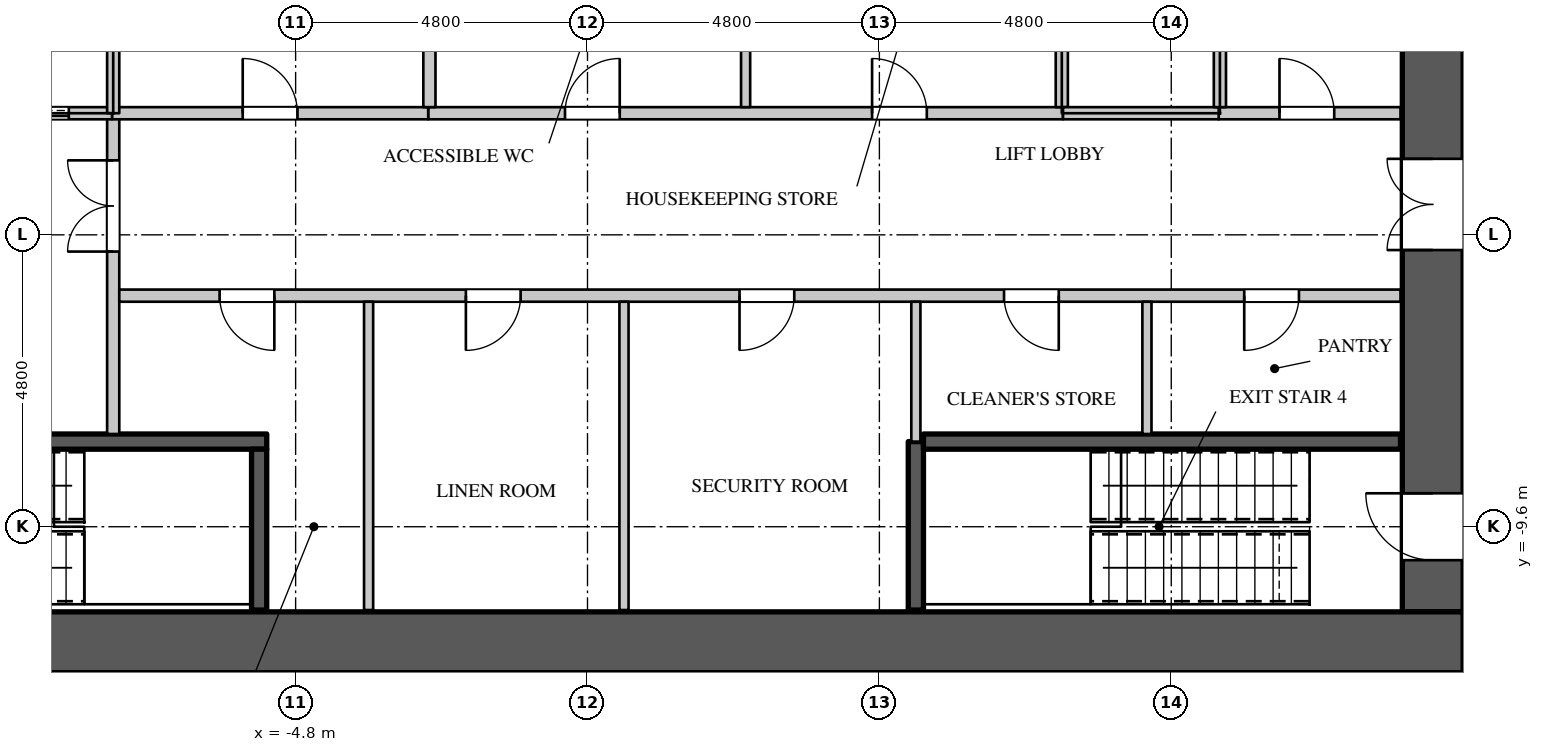
"""IFC4 building model, lengths in metres.
Left out: names, types, materials, properties, quantities, classifications, styles, units other than length and angle.
Written with IfcOpenShell. Run it as: python <this file> out.ifc"""

import sys

from ifc_helpers import new_model, si_unit, direction, frame, frame_2d, origin, place, context, subcontext, project, spatial, rectangle, extrude, element, fill, save


model = new_model("IFC4")
c1 = context("Model", 3, precision=1e-05, world=origin(), true_north=direction((0.0, 1.0)))
c2 = subcontext(c1, "Body", "Model", "MODEL_VIEW")
j1 = project(units=[si_unit("LENGTHUNIT", "METRE"), si_unit("PLANEANGLEUNIT", "RADIAN")], contexts=[c1])
p1 = place(None, origin())
s1 = spatial("IfcSite", under=j1, at=p1, CompositionType="ELEMENT")
p2 = place(p1, origin())
s2 = spatial("IfcBuilding", under=s1, at=p2, CompositionType="ELEMENT")
p3 = place(p2, frame((0.0, 0.0, 92.7)))
s3 = spatial("IfcBuildingStorey", under=s2, at=p3, CompositionType="ELEMENT", Elevation=92.7)
p4 = place(p3, frame((-14.4, -11.5, 0.0), z_axis=(0.0, 0.0, 1.0), x_axis=(1.0, 0.0, 0.0)))
e1 = element("IfcWall", 1, at=p4, inside=s3, PredefinedType="SHEAR", context=c2, shape_type="SweptSolid", body=[
    extrude(rectangle(XDim=28.8, YDim=1.0, at=frame_2d((14.4, 0.0))), origin(), (0.0, 0.0, 1.0), 4.2),
])
p5 = place(p3, frame((13.9, -11.0, 0.0), z_axis=(0.0, 0.0, 1.0), x_axis=(0.0, 1.0, 0.0)))
e2 = element("IfcWall", 2, at=p5, inside=s3, PredefinedType="SHEAR", context=c2, shape_type="SweptSolid", body=[
    extrude(rectangle(XDim=22.0, YDim=1.0, at=frame_2d((11.0, 0.0))), origin(), (0.0, 0.0, 1.0), 4.2),
])
p6 = place(p5, frame((20.05, 0.0, 0.0)))
e3 = element("IfcOpeningElement", 3, at=p6, cuts=e2, PredefinedType="OPENING", context=c2, shape_type="SweptSolid", body=[
    extrude(rectangle(XDim=1.1, YDim=2.2, at=frame_2d((0.55, 1.1))), frame((0.0, 0.51, 0.0), z_axis=(0.0, -1.0, 0.0), x_axis=(1.0, 0.0, 0.0)), (0.0, 0.0, 1.0), 1.02),
])
p7 = place(p5, frame((0.85, 0.0, 0.0)))
e4 = element("IfcOpeningElement", 4, at=p7, cuts=e2, PredefinedType="OPENING", context=c2, shape_type="SweptSolid", body=[
    extrude(rectangle(XDim=1.1, YDim=2.2, at=frame_2d((0.55, 1.1))), frame((0.0, 0.51, 0.0), z_axis=(0.0, -1.0, 0.0), x_axis=(1.0, 0.0, 0.0)), (0.0, 0.0, 1.0), 1.02),
])
p8 = place(p5, frame((14.55, 0.0, 0.0)))
e5 = element("IfcOpeningElement", 5, at=p8, cuts=e2, PredefinedType="OPENING", context=c2, shape_type="SweptSolid", body=[
    extrude(rectangle(XDim=1.5, YDim=2.4, at=frame_2d((0.75, 1.2))), frame((0.0, 0.51, 0.0), z_axis=(0.0, -1.0, 0.0), x_axis=(1.0, 0.0, 0.0)), (0.0, 0.0, 1.0), 1.02),
])
p9 = place(p5, frame((5.95, 0.0, 0.0)))
e6 = element("IfcOpeningElement", 6, at=p9, cuts=e2, PredefinedType="OPENING", context=c2, shape_type="SweptSolid", body=[
    extrude(rectangle(XDim=1.5, YDim=2.4, at=frame_2d((0.75, 1.2))), frame((0.0, 0.51, 0.0), z_axis=(0.0, -1.0, 0.0), x_axis=(1.0, 0.0, 0.0)), (0.0, 0.0, 1.0), 1.02),
])
p10 = place(p3, frame((-7.8, -8.075, 0.0), z_axis=(0.0, 0.0, 1.0), x_axis=(0.0, 1.0, 0.0)))
e7 = element("IfcWall", 7, at=p10, inside=s3, PredefinedType="PARTITIONING", context=c2, shape_type="SweptSolid", body=[
    extrude(rectangle(XDim=5.275, YDim=0.2, at=frame_2d((2.637, 0.0))), origin(), (0.0, 0.0, 1.0), 3.798),
])
p11 = place(p10, frame((3.0, 0.0, 0.0)))
e8 = element("IfcOpeningElement", 8, at=p11, cuts=e7, PredefinedType="OPENING", context=c2, shape_type="SweptSolid", body=[
    extrude(rectangle(XDim=1.5, YDim=2.4, at=frame_2d((0.75, 1.2))), frame((0.0, 0.11, 0.0), z_axis=(0.0, -1.0, 0.0), x_axis=(1.0, 0.0, 0.0)), (0.0, 0.0, 1.0), 0.22),
])
p12 = place(p3, frame((-7.7, -5.8, 0.0), z_axis=(0.0, 0.0, 1.0), x_axis=(1.0, 0.0, 0.0)))
e9 = element("IfcWall", 9, at=p12, inside=s3, PredefinedType="PARTITIONING", context=c2, shape_type="SweptSolid", body=[
    extrude(rectangle(XDim=21.07, YDim=0.2, at=frame_2d((10.535, 0.0))), origin(), (0.0, 0.0, 1.0), 3.798),
])
p13 = place(p12, frame((1.65, 0.0, 0.0)))
e10 = element("IfcOpeningElement", 10, at=p13, cuts=e9, PredefinedType="OPENING", context=c2, shape_type="SweptSolid", body=[
    extrude(rectangle(XDim=0.9, YDim=2.2, at=frame_2d((0.45, 1.1))), frame((0.0, 0.11, 0.0), z_axis=(0.0, -1.0, 0.0), x_axis=(1.0, 0.0, 0.0)), (0.0, 0.0, 1.0), 0.22),
])
p14 = place(p12, frame((5.7, 0.0, 0.0)))
e11 = element("IfcOpeningElement", 11, at=p14, cuts=e9, PredefinedType="OPENING", context=c2, shape_type="SweptSolid", body=[
    extrude(rectangle(XDim=0.9, YDim=2.2, at=frame_2d((0.45, 1.1))), frame((0.0, 0.11, 0.0), z_axis=(0.0, -1.0, 0.0), x_axis=(1.0, 0.0, 0.0)), (0.0, 0.0, 1.0), 0.22),
])
p15 = place(p12, frame((10.2, 0.0, 0.0)))
e12 = element("IfcOpeningElement", 12, at=p15, cuts=e9, PredefinedType="OPENING", context=c2, shape_type="SweptSolid", body=[
    extrude(rectangle(XDim=0.9, YDim=2.2, at=frame_2d((0.45, 1.1))), frame((0.0, 0.11, 0.0), z_axis=(0.0, -1.0, 0.0), x_axis=(1.0, 0.0, 0.0)), (0.0, 0.0, 1.0), 0.22),
])
p16 = place(p12, frame((14.55, 0.0, 0.0)))
e13 = element("IfcOpeningElement", 13, at=p16, cuts=e9, PredefinedType="OPENING", context=c2, shape_type="SweptSolid", body=[
    extrude(rectangle(XDim=0.9, YDim=2.2, at=frame_2d((0.45, 1.1))), frame((0.0, 0.11, 0.0), z_axis=(0.0, -1.0, 0.0), x_axis=(1.0, 0.0, 0.0)), (0.0, 0.0, 1.0), 0.22),
])
p17 = place(p12, frame((18.5, 0.0, 0.0)))
e14 = element("IfcOpeningElement", 14, at=p17, cuts=e9, PredefinedType="OPENING", context=c2, shape_type="SweptSolid", body=[
    extrude(rectangle(XDim=0.9, YDim=2.2, at=frame_2d((0.45, 1.1))), frame((0.0, 0.11, 0.0), z_axis=(0.0, -1.0, 0.0), x_axis=(1.0, 0.0, 0.0)), (0.0, 0.0, 1.0), 0.22),
])
p18 = place(p3, frame((-2.62, -2.8, 0.0), z_axis=(0.0, 0.0, 1.0), x_axis=(1.0, 0.0, 0.0)))
e15 = element("IfcWall", 15, at=p18, inside=s3, PredefinedType="PARTITIONING", context=c2, shape_type="SweptSolid", body=[
    extrude(rectangle(XDim=10.44, YDim=0.2, at=frame_2d((5.22, 0.0))), origin(), (0.0, 0.0, 1.0), 3.798),
])
p19 = place(p18, frame((2.25, 0.0, 0.0)))
e16 = element("IfcOpeningElement", 16, at=p19, cuts=e15, PredefinedType="OPENING", context=c2, shape_type="SweptSolid", body=[
    extrude(rectangle(XDim=0.9, YDim=2.2, at=frame_2d((0.45, 1.1))), frame((0.0, 0.11, 0.0), z_axis=(0.0, -1.0, 0.0), x_axis=(1.0, 0.0, 0.0)), (0.0, 0.0, 1.0), 0.22),
])
p20 = place(p18, frame((7.3, 0.0, 0.0)))
e17 = element("IfcOpeningElement", 17, at=p20, cuts=e15, PredefinedType="OPENING", context=c2, shape_type="SweptSolid", body=[
    extrude(rectangle(XDim=0.9, YDim=2.2, at=frame_2d((0.45, 1.1))), frame((0.0, 0.11, 0.0), z_axis=(0.0, -1.0, 0.0), x_axis=(1.0, 0.0, 0.0)), (0.0, 0.0, 1.0), 0.22),
])
for number, where, z_axis, x_axis in (
    (18, (-3.6, -10.97, 0.0), (0.0, 0.0, 1.0), (0.0, 1.0, 0.0)),
    (19, (0.6, -10.97, 0.0), (0.0, 0.0, 1.0), (0.0, 1.0, 0.0)),
):
    element("IfcWall", number, at=place(p3, frame(where, z_axis=z_axis, x_axis=x_axis)), inside=s3, PredefinedType="PARTITIONING", context=c2, shape_type="SweptSolid", body=[
        extrude(rectangle(XDim=5.07, YDim=0.15, at=frame_2d((2.535, 0.0))), origin(), (0.0, 0.0, 1.0), 3.798),
    ])
p21 = place(p3, frame((2.6, -2.7, 0.0), z_axis=(0.0, 0.0, 1.0), x_axis=(0.0, 1.0, 0.0)))
e20 = element("IfcWall", 20, at=p21, inside=s3, PredefinedType="PARTITIONING", context=c2, shape_type="SweptSolid", body=[
    extrude(rectangle(XDim=2.7, YDim=0.15, at=frame_2d((1.35, 0.0))), origin(), (0.0, 0.0, 1.0), 3.798),
])
p22 = place(p3, frame((5.4, -8.2, 0.0), z_axis=(0.0, 0.0, 1.0), x_axis=(0.0, 1.0, 0.0)))
e21 = element("IfcWall", 21, at=p22, inside=s3, PredefinedType="PARTITIONING", context=c2, shape_type="SweptSolid", body=[
    extrude(rectangle(XDim=2.3, YDim=0.15, at=frame_2d((1.15, 0.0))), origin(), (0.0, 0.0, 1.0), 3.798),
])
p23 = place(p3, frame((9.2, -8.075, 0.0), z_axis=(0.0, 0.0, 1.0), x_axis=(0.0, 1.0, 0.0)))
e22 = element("IfcWall", 22, at=p23, inside=s3, PredefinedType="PARTITIONING", context=c2, shape_type="SweptSolid", body=[
    extrude(rectangle(XDim=2.175, YDim=0.15, at=frame_2d((1.087, 0.0))), origin(), (0.0, 0.0, 1.0), 3.798),
])
p24 = place(p3, frame((-7.82, -2.8, 0.0), z_axis=(0.0, 0.0, 1.0), x_axis=(1.0, 0.0, 0.0)))
e23 = element("IfcWall", 23, at=p24, inside=s3, PredefinedType="PARTITIONING", context=c2, shape_type="SweptSolid", body=[
    extrude(rectangle(XDim=5.2, YDim=0.2, at=frame_2d((2.6, 0.0))), origin(), (0.0, 0.0, 1.0), 3.798),
])
p25 = place(p24, frame((2.15, 0.0, 0.0)))
e24 = element("IfcOpeningElement", 24, at=p25, cuts=e23, PredefinedType="OPENING", context=c2, shape_type="SweptSolid", body=[
    extrude(rectangle(XDim=0.9, YDim=2.2, at=frame_2d((0.45, 1.1))), frame((0.0, 0.11, 0.0), z_axis=(0.0, -1.0, 0.0), x_axis=(1.0, 0.0, 0.0)), (0.0, 0.0, 1.0), 0.22),
])
p26 = place(p3, frame((-2.6, -2.7, 0.0), z_axis=(0.0, 0.0, 1.0), x_axis=(0.0, 1.0, 0.0)))
e25 = element("IfcWall", 25, at=p26, inside=s3, PredefinedType="PARTITIONING", context=c2, shape_type="SweptSolid", body=[
    extrude(rectangle(XDim=2.7, YDim=0.2, at=frame_2d((1.35, 0.0))), origin(), (0.0, 0.0, 1.0), 3.798),
])
p27 = place(p3, frame((10.38, -2.8, 0.0), z_axis=(0.0, 0.0, 1.0), x_axis=(1.0, 0.0, 0.0)))
e26 = element("IfcWall", 26, at=p27, inside=s3, PredefinedType="PARTITIONING", context=c2, shape_type="SweptSolid", body=[
    extrude(rectangle(XDim=2.99, YDim=0.2, at=frame_2d((1.495, 0.0))), origin(), (0.0, 0.0, 1.0), 3.798),
])
p28 = place(p27, frame((1.0, 0.0, 0.0)))
e27 = element("IfcOpeningElement", 27, at=p28, cuts=e26, PredefinedType="OPENING", context=c2, shape_type="SweptSolid", body=[
    extrude(rectangle(XDim=0.9, YDim=2.2, at=frame_2d((0.45, 1.1))), frame((0.0, 0.11, 0.0), z_axis=(0.0, -1.0, 0.0), x_axis=(1.0, 0.0, 0.0)), (0.0, 0.0, 1.0), 0.22),
])
p29 = place(p3, frame((-10.38, -2.8, 0.0), z_axis=(0.0, 0.0, 1.0), x_axis=(1.0, 0.0, 0.0)))
e28 = element("IfcWall", 28, at=p29, inside=s3, PredefinedType="PARTITIONING", context=c2, shape_type="SweptSolid", body=[
    extrude(rectangle(XDim=2.56, YDim=0.2, at=frame_2d((1.28, 0.0))), origin(), (0.0, 0.0, 1.0), 3.798),
])
p30 = place(p29, frame((0.75, 0.0, 0.0)))
e29 = element("IfcOpeningElement", 29, at=p30, cuts=e28, PredefinedType="OPENING", context=c2, shape_type="SweptSolid", body=[
    extrude(rectangle(XDim=1.1, YDim=2.2, at=frame_2d((0.55, 1.1))), frame((0.0, 0.11, 0.0), z_axis=(0.0, -1.0, 0.0), x_axis=(1.0, 0.0, 0.0)), (0.0, 0.0, 1.0), 0.22),
])
p31 = place(p3, frame((-7.8, -2.8, 0.0), z_axis=(0.0, 0.0, 1.0), x_axis=(0.0, 1.0, 0.0)))
e30 = element("IfcWall", 30, at=p31, inside=s3, PredefinedType="PARTITIONING", context=c2, shape_type="SweptSolid", body=[
    extrude(rectangle(XDim=2.8, YDim=0.2, at=frame_2d((1.4, 0.0))), origin(), (0.0, 0.0, 1.0), 3.798),
])
p32 = place(p3, frame((7.8, -2.7, 0.0), z_axis=(0.0, 0.0, 1.0), x_axis=(0.0, 1.0, 0.0)))
e31 = element("IfcWall", 31, at=p32, inside=s3, PredefinedType="PARTITIONING", context=c2, shape_type="SweptSolid", body=[
    extrude(rectangle(XDim=2.7, YDim=0.2, at=frame_2d((1.35, 0.0))), origin(), (0.0, 0.0, 1.0), 3.798),
])
p33 = place(p3, frame((7.82, -2.8, 0.0), z_axis=(0.0, 0.0, 1.0), x_axis=(1.0, 0.0, 0.0)))
e32 = element("IfcWall", 32, at=p33, inside=s3, PredefinedType="PARTITIONING", context=c2, shape_type="SweptSolid", body=[
    extrude(rectangle(XDim=2.56, YDim=0.2, at=frame_2d((1.28, 0.0))), origin(), (0.0, 0.0, 1.0), 3.798),
])
p34 = place(p3, frame((10.4, -2.7, 0.0), z_axis=(0.0, 0.0, 1.0), x_axis=(0.0, 1.0, 0.0)))
e33 = element("IfcWall", 33, at=p34, inside=s3, PredefinedType="PARTITIONING", context=c2, shape_type="SweptSolid", body=[
    extrude(rectangle(XDim=5.4, YDim=0.2, at=frame_2d((2.7, 0.0))), origin(), (0.0, 0.0, 1.0), 3.798),
])
p35 = place(p3, frame((-13.37, -8.2, 0.0), z_axis=(0.0, 0.0, 1.0), x_axis=(1.0, 0.0, 0.0)))
e34 = element("IfcWall", 34, at=p35, inside=s3, PredefinedType="SHEAR", context=c2, shape_type="SweptSolid", body=[
    extrude(rectangle(XDim=8.095, YDim=0.25, at=frame_2d((4.048, 0.0))), origin(), (0.0, 0.0, 1.0), 3.798),
])
p36 = place(p35, frame((0.15, 0.0, 0.0)))
e35 = element("IfcOpeningElement", 35, at=p36, cuts=e34, PredefinedType="OPENING", context=c2, shape_type="SweptSolid", body=[
    extrude(rectangle(XDim=1.1, YDim=2.2, at=frame_2d((0.55, 1.1))), frame((0.0, 0.135, 0.0), z_axis=(0.0, -1.0, 0.0), x_axis=(1.0, 0.0, 0.0)), (0.0, 0.0, 1.0), 0.27),
])
p37 = place(p3, frame((-5.4, -10.97, 0.0), z_axis=(0.0, 0.0, 1.0), x_axis=(0.0, 1.0, 0.0)))
e36 = element("IfcWall", 36, at=p37, inside=s3, PredefinedType="SHEAR", context=c2, shape_type="SweptSolid", body=[
    extrude(rectangle(XDim=2.645, YDim=0.25, at=frame_2d((1.323, 0.0))), origin(), (0.0, 0.0, 1.0), 3.798),
])
p38 = place(p3, frame((5.4, -10.97, 0.0), z_axis=(0.0, 0.0, 1.0), x_axis=(0.0, 1.0, 0.0)))
e37 = element("IfcWall", 37, at=p38, inside=s3, PredefinedType="SHEAR", context=c2, shape_type="SweptSolid", body=[
    extrude(rectangle(XDim=2.77, YDim=0.25, at=frame_2d((1.385, 0.0))), origin(), (0.0, 0.0, 1.0), 3.798),
])
p39 = place(p3, frame((5.525, -8.2, 0.0), z_axis=(0.0, 0.0, 1.0), x_axis=(1.0, 0.0, 0.0)))
e38 = element("IfcWall", 38, at=p39, inside=s3, PredefinedType="SHEAR", context=c2, shape_type="SweptSolid", body=[
    extrude(rectangle(XDim=7.845, YDim=0.25, at=frame_2d((3.923, 0.0))), origin(), (0.0, 0.0, 1.0), 3.798),
])
p40 = place(p28, origin())
e39 = element("IfcDoor", 39, at=p40, inside=s3, OperationType="SINGLE_SWING_LEFT", PredefinedType="DOOR", context=c2, shape_type="SweptSolid", body=[
    extrude(rectangle(XDim=0.9, YDim=2.2, at=frame_2d((0.45, 1.1))), frame((0.0, 0.025, 0.0), z_axis=(0.0, -1.0, 0.0), x_axis=(1.0, 0.0, 0.0)), (0.0, 0.0, 1.0), 0.05),
])
fill(e27, e39)
p41 = place(p13, origin())
e40 = element("IfcDoor", 40, at=p41, inside=s3, OperationType="SINGLE_SWING_LEFT", PredefinedType="DOOR", context=c2, shape_type="SweptSolid", body=[
    extrude(rectangle(XDim=0.9, YDim=2.2, at=frame_2d((0.45, 1.1))), frame((0.0, 0.025, 0.0), z_axis=(0.0, -1.0, 0.0), x_axis=(1.0, 0.0, 0.0)), (0.0, 0.0, 1.0), 0.05),
])
fill(e10, e40)
p42 = place(p14, origin())
e41 = element("IfcDoor", 41, at=p42, inside=s3, OperationType="SINGLE_SWING_RIGHT", PredefinedType="DOOR", context=c2, shape_type="SweptSolid", body=[
    extrude(rectangle(XDim=0.9, YDim=2.2, at=frame_2d((0.45, 1.1))), frame((0.0, 0.025, 0.0), z_axis=(0.0, -1.0, 0.0), x_axis=(1.0, 0.0, 0.0)), (0.0, 0.0, 1.0), 0.05),
])
fill(e11, e41)
p43 = place(p15, origin())
e42 = element("IfcDoor", 42, at=p43, inside=s3, OperationType="SINGLE_SWING_RIGHT", PredefinedType="DOOR", context=c2, shape_type="SweptSolid", body=[
    extrude(rectangle(XDim=0.9, YDim=2.2, at=frame_2d((0.45, 1.1))), frame((0.0, 0.025, 0.0), z_axis=(0.0, -1.0, 0.0), x_axis=(1.0, 0.0, 0.0)), (0.0, 0.0, 1.0), 0.05),
])
fill(e12, e42)
p44 = place(p16, origin())
e43 = element("IfcDoor", 43, at=p44, inside=s3, OperationType="SINGLE_SWING_LEFT", PredefinedType="DOOR", context=c2, shape_type="SweptSolid", body=[
    extrude(rectangle(XDim=0.9, YDim=2.2, at=frame_2d((0.45, 1.1))), frame((0.0, 0.025, 0.0), z_axis=(0.0, -1.0, 0.0), x_axis=(1.0, 0.0, 0.0)), (0.0, 0.0, 1.0), 0.05),
])
fill(e13, e43)
p45 = place(p17, origin())
e44 = element("IfcDoor", 44, at=p45, inside=s3, OperationType="SINGLE_SWING_RIGHT", PredefinedType="DOOR", context=c2, shape_type="SweptSolid", body=[
    extrude(rectangle(XDim=0.9, YDim=2.2, at=frame_2d((0.45, 1.1))), frame((0.0, 0.025, 0.0), z_axis=(0.0, -1.0, 0.0), x_axis=(1.0, 0.0, 0.0)), (0.0, 0.0, 1.0), 0.05),
])
fill(e14, e44)
p46 = place(p25, origin())
e45 = element("IfcDoor", 45, at=p46, inside=s3, OperationType="SINGLE_SWING_LEFT", PredefinedType="DOOR", context=c2, shape_type="SweptSolid", body=[
    extrude(rectangle(XDim=0.9, YDim=2.2, at=frame_2d((0.45, 1.1))), frame((0.0, 0.025, 0.0), z_axis=(0.0, -1.0, 0.0), x_axis=(1.0, 0.0, 0.0)), (0.0, 0.0, 1.0), 0.05),
])
fill(e24, e45)
p47 = place(p19, origin())
e46 = element("IfcDoor", 46, at=p47, inside=s3, OperationType="SINGLE_SWING_RIGHT", PredefinedType="DOOR", context=c2, shape_type="SweptSolid", body=[
    extrude(rectangle(XDim=0.9, YDim=2.2, at=frame_2d((0.45, 1.1))), frame((0.0, 0.025, 0.0), z_axis=(0.0, -1.0, 0.0), x_axis=(1.0, 0.0, 0.0)), (0.0, 0.0, 1.0), 0.05),
])
fill(e16, e46)
p48 = place(p20, origin())
e47 = element("IfcDoor", 47, at=p48, inside=s3, OperationType="SINGLE_SWING_LEFT", PredefinedType="DOOR", context=c2, shape_type="SweptSolid", body=[
    extrude(rectangle(XDim=0.9, YDim=2.2, at=frame_2d((0.45, 1.1))), frame((0.0, 0.025, 0.0), z_axis=(0.0, -1.0, 0.0), x_axis=(1.0, 0.0, 0.0)), (0.0, 0.0, 1.0), 0.05),
])
fill(e17, e47)
p49 = place(p30, origin())
e48 = element("IfcDoor", 48, at=p49, inside=s3, OperationType="DOUBLE_DOOR_SLIDING", PredefinedType="DOOR", context=c2, shape_type="SweptSolid", body=[
    extrude(rectangle(XDim=1.1, YDim=2.2, at=frame_2d((0.55, 1.1))), frame((0.0, 0.025, 0.0), z_axis=(0.0, -1.0, 0.0), x_axis=(1.0, 0.0, 0.0)), (0.0, 0.0, 1.0), 0.05),
])
fill(e29, e48)
p50 = place(p11, origin())
e49 = element("IfcDoor", 49, at=p50, inside=s3, OperationType="DOUBLE_DOOR_SINGLE_SWING", PredefinedType="DOOR", context=c2, shape_type="SweptSolid", body=[
    extrude(rectangle(XDim=1.5, YDim=2.4, at=frame_2d((0.75, 1.2))), frame((0.0, 0.025, 0.0), z_axis=(0.0, -1.0, 0.0), x_axis=(1.0, 0.0, 0.0)), (0.0, 0.0, 1.0), 0.05),
])
fill(e8, e49)
p51 = place(p7, origin())
e50 = element("IfcDoor", 50, at=p51, inside=s3, OperationType="SINGLE_SWING_RIGHT", PredefinedType="DOOR", context=c2, shape_type="SweptSolid", body=[
    extrude(rectangle(XDim=1.1, YDim=2.2, at=frame_2d((0.55, 1.1))), frame((0.0, 0.495, 0.0), z_axis=(0.0, -1.0, 0.0), x_axis=(1.0, 0.0, 0.0)), (0.0, 0.0, 1.0), 0.05),
])
fill(e4, e50)
p52 = place(p9, origin())
e51 = element("IfcDoor", 51, at=p52, inside=s3, OperationType="DOUBLE_DOOR_SINGLE_SWING", PredefinedType="DOOR", context=c2, shape_type="SweptSolid", body=[
    extrude(rectangle(XDim=1.5, YDim=2.4, at=frame_2d((0.75, 1.2))), frame((0.0, 0.495, 0.0), z_axis=(0.0, -1.0, 0.0), x_axis=(1.0, 0.0, 0.0)), (0.0, 0.0, 1.0), 0.05),
])
fill(e6, e51)
save(model, sys.argv[1])
